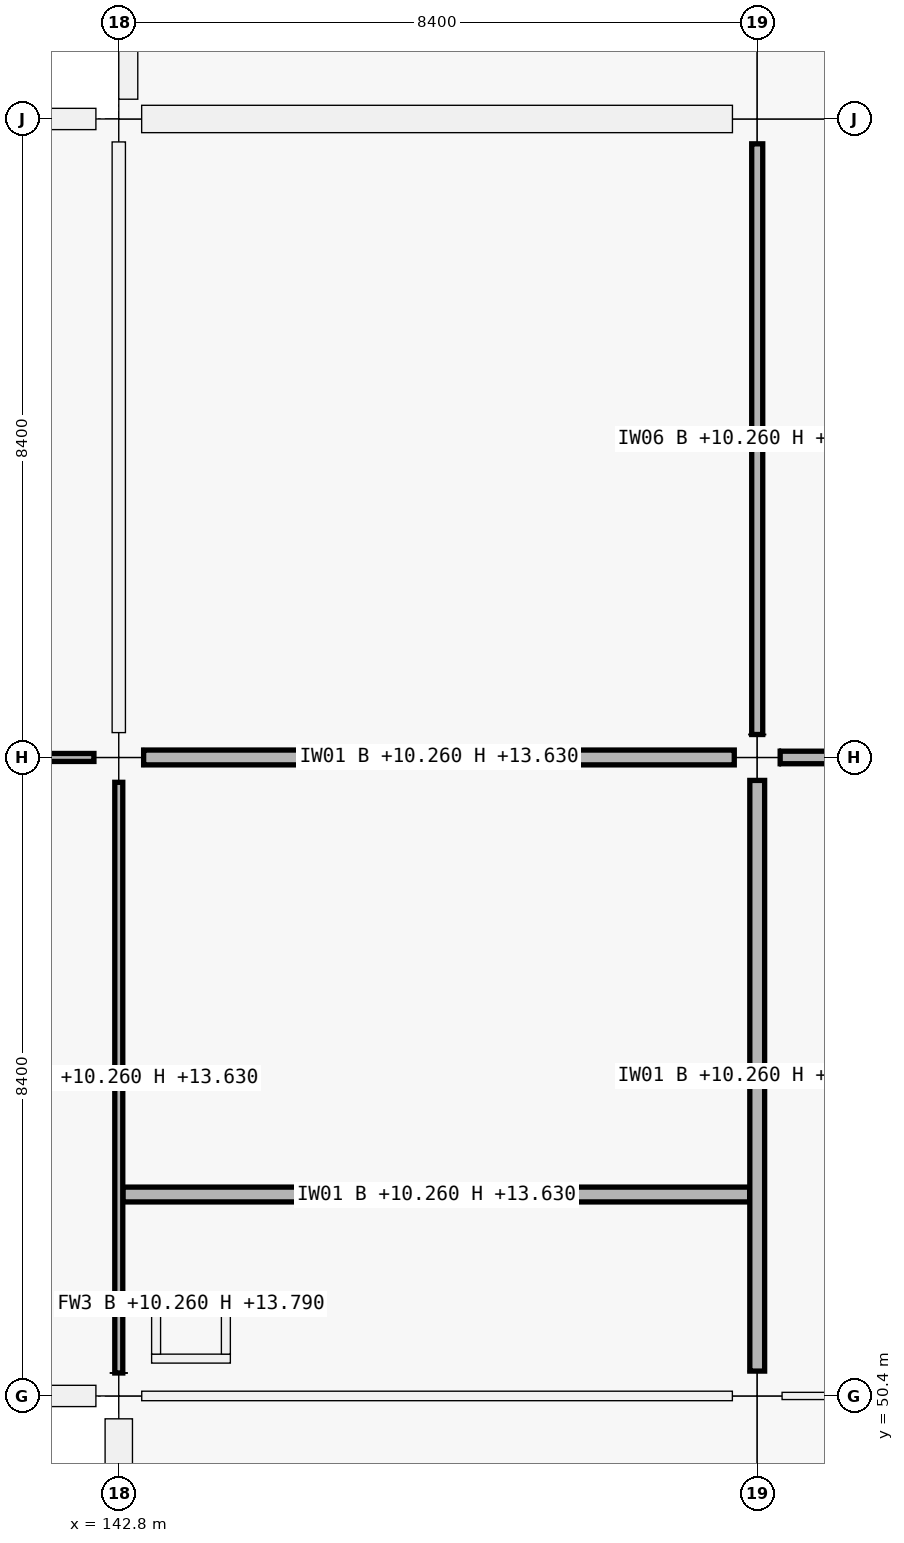
"""IFC4 building model, lengths in metres.
Left out: names, types, materials, properties, quantities, classifications, styles, units other than length and angle.
Written with IfcOpenShell. Run it as: python <this file> out.ifc"""

import sys

from ifc_helpers import new_model, si_unit, direction, frame, frame_2d, origin, origin_2d, place, context, subcontext, project, spatial, rectangle, extrude, element, fill, save


model = new_model("IFC4")
c1 = context("Model", 3, precision=1e-05, world=origin(), true_north=direction((0.0, 1.0)))
c2 = subcontext(c1, "Body", "Model", "MODEL_VIEW")
j1 = project(units=[si_unit("LENGTHUNIT", "METRE"), si_unit("PLANEANGLEUNIT", "RADIAN")], contexts=[c1])
p1 = place(None, origin())
s1 = spatial("IfcSite", under=j1, at=p1, CompositionType="ELEMENT")
p2 = place(p1, origin())
s2 = spatial("IfcBuilding", under=s1, at=p2, CompositionType="ELEMENT")
p3 = place(p2, frame((0.0, 0.0, 10.26)))
s3 = spatial("IfcBuildingStorey", under=s2, at=p3, CompositionType="ELEMENT", Elevation=10.26)
p4 = place(p3, frame((142.8, 50.4, 0.0), z_axis=(0.0, 0.0, 1.0), x_axis=(1.0, 0.0, 0.0)))
e1 = element("IfcColumn", 1, at=p4, inside=s3, PredefinedType="COLUMN", context=c2, shape_type="SweptSolid", body=[
    extrude(rectangle(XDim=0.6, YDim=0.6, at=origin_2d()), origin(), (0.0, 0.0, 1.0), 4.5),
])
p5 = place(p3, frame((142.8, 58.8, 0.0), z_axis=(0.0, 0.0, 1.0), x_axis=(1.0, 0.0, 0.0)))
e2 = element("IfcColumn", 2, at=p5, inside=s3, PredefinedType="COLUMN", context=c2, shape_type="SweptSolid", body=[
    extrude(rectangle(XDim=0.65, YDim=0.65, at=origin_2d()), origin(), (0.0, 0.0, 1.0), 4.5),
])
p6 = place(p3, frame((142.8, 67.2, 0.0), z_axis=(0.0, 0.0, 1.0), x_axis=(1.0, 0.0, 0.0)))
e3 = element("IfcColumn", 3, at=p6, inside=s3, PredefinedType="COLUMN", context=c2, shape_type="SweptSolid", body=[
    extrude(rectangle(XDim=0.6, YDim=0.6, at=origin_2d()), origin(), (0.0, 0.0, 1.0), 4.5),
])
p7 = place(p3, frame((151.2, 50.4, 0.0), z_axis=(0.0, 0.0, 1.0), x_axis=(1.0, 0.0, 0.0)))
e4 = element("IfcColumn", 4, at=p7, inside=s3, PredefinedType="COLUMN", context=c2, shape_type="SweptSolid", body=[
    extrude(rectangle(XDim=0.65, YDim=0.65, at=origin_2d()), origin(), (0.0, 0.0, 1.0), 4.5),
])
p8 = place(p3, frame((151.2, 58.8, 0.0), z_axis=(0.0, 0.0, 1.0), x_axis=(1.0, 0.0, 0.0)))
e5 = element("IfcColumn", 5, at=p8, inside=s3, PredefinedType="COLUMN", context=c2, shape_type="SweptSolid", body=[
    extrude(rectangle(XDim=0.6, YDim=0.6, at=origin_2d()), origin(), (0.0, 0.0, 1.0), 4.5),
])
p9 = place(p3, frame((151.2, 67.2, 0.0), z_axis=(0.0, 0.0, 1.0), x_axis=(1.0, 0.0, 0.0)))
e6 = element("IfcColumn", 6, at=p9, inside=s3, PredefinedType="COLUMN", context=c2, shape_type="SweptSolid", body=[
    extrude(rectangle(XDim=0.65, YDim=0.65, at=origin_2d()), origin(), (0.0, 0.0, 1.0), 4.5),
])
p10 = place(p3, frame((142.499, 50.4, 0.0), z_axis=(0.0, 0.0, 1.0), x_axis=(-1.0, 0.0, 0.0)))
e7 = element("IfcWall", 7, at=p10, inside=s3, PredefinedType="SOLIDWALL", context=c2, shape_type="SweptSolid", body=[
    extrude(rectangle(XDim=7.773, YDim=0.28, at=frame_2d((3.886, 0.0))), origin(), (0.0, 0.0, 1.0), 3.54),
])
p11 = place(p10, frame((2.911, 0.0, 0.9)))
e8 = element("IfcOpeningElement", 8, at=p11, cuts=e7, PredefinedType="OPENING", context=c2, shape_type="SweptSolid", body=[
    extrude(rectangle(XDim=1.95, YDim=1.6, at=frame_2d((0.975, 0.8))), frame((0.0, 0.14, 0.0), z_axis=(0.0, -1.0, 0.0), x_axis=(1.0, 0.0, 0.0)), (0.0, 0.0, 1.0), 0.28),
])
p12 = place(p3, frame((134.676, 67.2, 0.0), z_axis=(0.0, 0.0, 1.0), x_axis=(1.0, 0.0, 0.0)))
e9 = element("IfcWall", 9, at=p12, inside=s3, PredefinedType="SOLIDWALL", context=c2, shape_type="SweptSolid", body=[
    extrude(rectangle(XDim=7.823, YDim=0.28, at=frame_2d((3.912, 0.0))), origin(), (0.0, 0.0, 1.0), 3.54),
])
p13 = place(p12, frame((2.737, 0.0, 0.9)))
e10 = element("IfcOpeningElement", 10, at=p13, cuts=e9, PredefinedType="OPENING", context=c2, shape_type="SweptSolid", body=[
    extrude(rectangle(XDim=2.35, YDim=1.6, at=frame_2d((1.175, 0.8))), frame((0.0, 0.14, 0.0), z_axis=(0.0, -1.0, 0.0), x_axis=(1.0, 0.0, 0.0)), (0.0, 0.0, 1.0), 0.28),
])
p14 = place(p3, frame((142.8, 42.326, 0.0), z_axis=(0.0, 0.0, 1.0), x_axis=(0.0, 1.0, 0.0)))
e11 = element("IfcWall", 11, at=p14, inside=s3, PredefinedType="SOLIDWALL", context=c2, shape_type="SweptSolid", body=[
    extrude(rectangle(XDim=7.773, YDim=0.36, at=frame_2d((3.887, 0.0))), origin(), (0.0, 0.0, 1.0), 3.54),
])
p15 = place(p14, frame((2.837, 0.0, 0.9)))
e12 = element("IfcOpeningElement", 12, at=p15, cuts=e11, PredefinedType="OPENING", context=c2, shape_type="SweptSolid", body=[
    extrude(rectangle(XDim=2.1, YDim=1.8, at=frame_2d((1.05, 0.9))), frame((0.0, 0.18, 0.0), z_axis=(0.0, -1.0, 0.0), x_axis=(1.0, 0.0, 0.0)), (0.0, 0.0, 1.0), 0.36),
])
p16 = place(p3, frame((143.101, 67.2, 0.0), z_axis=(0.0, 0.0, 1.0), x_axis=(1.0, 0.0, 0.0)))
e13 = element("IfcWall", 13, at=p16, inside=s3, PredefinedType="SOLIDWALL", context=c2, shape_type="SweptSolid", body=[
    extrude(rectangle(XDim=7.773, YDim=0.36, at=frame_2d((3.886, 0.0))), origin(), (0.0, 0.0, 1.0), 3.54),
])
p17 = place(p16, frame((2.686, 0.0, 0.9)))
e14 = element("IfcOpeningElement", 14, at=p17, cuts=e13, PredefinedType="OPENING", context=c2, shape_type="SweptSolid", body=[
    extrude(rectangle(XDim=2.4, YDim=1.8, at=frame_2d((1.2, 0.9))), frame((0.0, 0.18, 0.0), z_axis=(0.0, -1.0, 0.0), x_axis=(1.0, 0.0, 0.0)), (0.0, 0.0, 1.0), 0.36),
])
p18 = place(p3, frame((142.925, 67.46, 0.0), z_axis=(0.0, 0.0, 1.0), x_axis=(0.0, 1.0, 0.0)))
e15 = element("IfcWall", 15, at=p18, inside=s3, PredefinedType="PARAPET", context=c2, shape_type="SweptSolid", body=[
    extrude(rectangle(XDim=7.88, YDim=0.25, at=frame_2d((3.94, 0.0))), origin(), (0.0, 0.0, 1.0), 0.95),
])
for number, where, z_axis, x_axis in (
    (16, (143.232, 50.891, 0.0), (0.0, 0.0, 1.0), (1.0, 0.0, 0.0)),
    (17, (143.232, 51.609, 0.0), (0.0, 0.0, 1.0), (1.0, 0.0, 0.0)),
):
    element("IfcWall", number, at=place(p3, frame(where, z_axis=z_axis, x_axis=x_axis)), inside=s3, PredefinedType="PARTITIONING", context=c2, shape_type="SweptSolid", body=[
        extrude(rectangle(XDim=1.036, YDim=0.118, at=frame_2d((0.518, 0.0))), origin(), (0.0, 0.0, 1.0), 3.53),
    ])
for number, where, z_axis, x_axis in (
    (18, (143.291, 50.95, 0.0), (0.0, 0.0, 1.0), (0.0, 1.0, 0.0)),
    (19, (144.209, 50.95, 0.0), (0.0, 0.0, 1.0), (0.0, 1.0, 0.0)),
):
    element("IfcWall", number, at=place(p3, frame(where, z_axis=z_axis, x_axis=x_axis)), inside=s3, PredefinedType="PARTITIONING", context=c2, shape_type="SweptSolid", body=[
        extrude(rectangle(XDim=0.6, YDim=0.118, at=frame_2d((0.3, 0.0))), origin(), (0.0, 0.0, 1.0), 3.53),
    ])
p19 = place(p3, frame((134.702, 58.8, 0.0), z_axis=(0.0, 0.0, 1.0), x_axis=(1.0, 0.0, 0.0)))
e20 = element("IfcWall", 20, at=p19, inside=s3, PredefinedType="PARTITIONING", context=c2, shape_type="SweptSolid", body=[
    extrude(rectangle(XDim=7.771, YDim=0.105, at=frame_2d((3.885, 0.0))), origin(), (0.0, 0.0, 1.0), 3.37),
])
p20 = place(p19, frame((3.415, 0.0, 0.0)))
e21 = element("IfcOpeningElement", 21, at=p20, cuts=e20, PredefinedType="OPENING", context=c2, shape_type="SweptSolid", body=[
    extrude(rectangle(XDim=0.94, YDim=2.15, at=frame_2d((0.47, 1.075))), frame((0.0, 0.052, 0.0), z_axis=(0.0, -1.0, 0.0), x_axis=(1.0, 0.0, 0.0)), (0.0, 0.0, 1.0), 0.105),
])
p21 = place(p3, frame((143.102, 50.4, 0.0), z_axis=(0.0, 0.0, 1.0), x_axis=(1.0, 0.0, 0.0)))
e22 = element("IfcWall", 22, at=p21, inside=s3, PredefinedType="PARTITIONING", context=c2, shape_type="SweptSolid", body=[
    extrude(rectangle(XDim=7.771, YDim=0.125, at=frame_2d((3.885, 0.0))), origin(), (0.0, 0.0, 1.0), 3.37),
])
p22 = place(p3, frame((143.127, 58.8, 0.0), z_axis=(0.0, 0.0, 1.0), x_axis=(1.0, 0.0, 0.0)))
e23 = element("IfcWall", 23, at=p22, inside=s3, PredefinedType="PARTITIONING", context=c2, shape_type="SweptSolid", body=[
    extrude(rectangle(XDim=7.771, YDim=0.195, at=frame_2d((3.885, 0.0))), origin(), (0.0, 0.0, 1.0), 3.37),
])
p23 = place(p3, frame((151.527, 50.4, 0.0), z_axis=(0.0, 0.0, 1.0), x_axis=(1.0, 0.0, 0.0)))
e24 = element("IfcWall", 24, at=p23, inside=s3, PredefinedType="PARTITIONING", context=c2, shape_type="SweptSolid", body=[
    extrude(rectangle(XDim=7.771, YDim=0.095, at=frame_2d((3.885, 0.0))), origin(), (0.0, 0.0, 1.0), 3.37),
])
p24 = place(p23, frame((3.405, 0.0, 0.0)))
e25 = element("IfcOpeningElement", 25, at=p24, cuts=e24, PredefinedType="OPENING", context=c2, shape_type="SweptSolid", body=[
    extrude(rectangle(XDim=0.96, YDim=2.18, at=frame_2d((0.48, 1.09))), frame((0.0, 0.047, 0.0), z_axis=(0.0, -1.0, 0.0), x_axis=(1.0, 0.0, 0.0)), (0.0, 0.0, 1.0), 0.095),
])
p25 = place(p3, frame((151.502, 58.8, 0.0), z_axis=(0.0, 0.0, 1.0), x_axis=(1.0, 0.0, 0.0)))
e26 = element("IfcWall", 26, at=p25, inside=s3, PredefinedType="PARTITIONING", context=c2, shape_type="SweptSolid", body=[
    extrude(rectangle(XDim=7.771, YDim=0.165, at=frame_2d((3.885, 0.0))), origin(), (0.0, 0.0, 1.0), 3.37),
])
p26 = place(p25, frame((3.415, 0.0, 0.0)))
e27 = element("IfcOpeningElement", 27, at=p26, cuts=e26, PredefinedType="OPENING", context=c2, shape_type="SweptSolid", body=[
    extrude(rectangle(XDim=0.94, YDim=2.15, at=frame_2d((0.47, 1.075))), frame((0.0, 0.083, 0.0), z_axis=(0.0, -1.0, 0.0), x_axis=(1.0, 0.0, 0.0)), (0.0, 0.0, 1.0), 0.165),
])
p27 = place(p3, frame((142.8, 50.702, 0.0), z_axis=(0.0, 0.0, 1.0), x_axis=(0.0, 1.0, 0.0)))
e28 = element("IfcWall", 28, at=p27, inside=s3, PredefinedType="PARTITIONING", context=c2, shape_type="SweptSolid", body=[
    extrude(rectangle(XDim=7.771, YDim=0.105, at=frame_2d((3.885, 0.0))), origin(), (0.0, 0.0, 1.0), 3.37),
])
p28 = place(p27, frame((0.673, 0.0, 0.0)))
e29 = element("IfcOpeningElement", 29, at=p28, cuts=e28, PredefinedType="OPENING", context=c2, shape_type="SweptSolid", body=[
    extrude(rectangle(XDim=0.98, YDim=2.08, at=frame_2d((0.49, 1.04))), frame((0.0, 0.052, 0.0), z_axis=(0.0, -1.0, 0.0), x_axis=(1.0, 0.0, 0.0)), (0.0, 0.0, 1.0), 0.105),
])
p29 = place(p27, frame((4.613, 0.0, 0.0)))
e30 = element("IfcOpeningElement", 30, at=p29, cuts=e28, PredefinedType="OPENING", context=c2, shape_type="SweptSolid", body=[
    extrude(rectangle(XDim=0.94, YDim=2.08, at=frame_2d((0.47, 1.04))), frame((0.0, 0.052, 0.0), z_axis=(0.0, -1.0, 0.0), x_axis=(1.0, 0.0, 0.0)), (0.0, 0.0, 1.0), 0.105),
])
p30 = place(p3, frame((142.8, 59.127, 0.0), z_axis=(0.0, 0.0, 1.0), x_axis=(0.0, 1.0, 0.0)))
e31 = element("IfcWall", 31, at=p30, inside=s3, PredefinedType="PARTITIONING", context=c2, shape_type="SweptSolid", body=[
    extrude(rectangle(XDim=7.771, YDim=0.175, at=frame_2d((3.885, 0.0))), origin(), (0.0, 0.0, 1.0), 3.37),
])
p31 = place(p30, frame((3.345, 0.0, 0.0)))
e32 = element("IfcOpeningElement", 32, at=p31, cuts=e31, PredefinedType="OPENING", context=c2, shape_type="SweptSolid", body=[
    extrude(rectangle(XDim=1.08, YDim=2.25, at=frame_2d((0.54, 1.125))), frame((0.0, 0.087, 0.0), z_axis=(0.0, -1.0, 0.0), x_axis=(1.0, 0.0, 0.0)), (0.0, 0.0, 1.0), 0.175),
])
p32 = place(p3, frame((151.2, 50.727, 0.0), z_axis=(0.0, 0.0, 1.0), x_axis=(0.0, 1.0, 0.0)))
e33 = element("IfcWall", 33, at=p32, inside=s3, PredefinedType="PARTITIONING", context=c2, shape_type="SweptSolid", body=[
    extrude(rectangle(XDim=7.771, YDim=0.195, at=frame_2d((3.885, 0.0))), origin(), (0.0, 0.0, 1.0), 3.37),
])
p33 = place(p3, frame((151.2, 59.102, 0.0), z_axis=(0.0, 0.0, 1.0), x_axis=(0.0, 1.0, 0.0)))
e34 = element("IfcWall", 34, at=p33, inside=s3, PredefinedType="PARTITIONING", context=c2, shape_type="SweptSolid", body=[
    extrude(rectangle(XDim=7.771, YDim=0.145, at=frame_2d((3.885, 0.0))), origin(), (0.0, 0.0, 1.0), 3.37),
])
p34 = place(p33, frame((3.401, 0.0, 0.0)))
e35 = element("IfcOpeningElement", 35, at=p34, cuts=e34, PredefinedType="OPENING", context=c2, shape_type="SweptSolid", body=[
    extrude(rectangle(XDim=0.97, YDim=2.12, at=frame_2d((0.485, 1.06))), frame((0.0, 0.073, 0.0), z_axis=(0.0, -1.0, 0.0), x_axis=(1.0, 0.0, 0.0)), (0.0, 0.0, 1.0), 0.145),
])
p35 = place(p3, frame((142.854, 53.05, 0.0), z_axis=(0.0, 0.0, 1.0), x_axis=(1.0, 0.0, 0.0)))
e36 = element("IfcWall", 36, at=p35, inside=s3, PredefinedType="PARTITIONING", context=c2, shape_type="SweptSolid", body=[
    extrude(rectangle(XDim=8.246, YDim=0.195, at=frame_2d((4.123, 0.0))), origin(), (0.0, 0.0, 1.0), 3.37),
])
p36 = place(p17, origin())
e37 = element("IfcWindow", 37, at=p36, inside=s3, PartitioningType="SINGLE_PANEL", PredefinedType="WINDOW", context=c2, shape_type="SweptSolid", body=[
    extrude(rectangle(XDim=2.4, YDim=1.8, at=frame_2d((1.2, 0.9))), frame((0.0, 0.03, 0.0), z_axis=(0.0, -1.0, 0.0), x_axis=(1.0, 0.0, 0.0)), (0.0, 0.0, 1.0), 0.06),
])
fill(e14, e37)
p37 = place(p28, origin())
e38 = element("IfcDoor", 38, at=p37, inside=s3, OperationType="SINGLE_SWING_RIGHT", PredefinedType="DOOR", context=c2, shape_type="SweptSolid", body=[
    extrude(rectangle(XDim=0.98, YDim=2.08, at=frame_2d((0.49, 1.04))), frame((0.0, 0.025, 0.0), z_axis=(0.0, -1.0, 0.0), x_axis=(1.0, 0.0, 0.0)), (0.0, 0.0, 1.0), 0.05),
])
fill(e29, e38)
p38 = place(p29, origin())
e39 = element("IfcDoor", 39, at=p38, inside=s3, OperationType="SINGLE_SWING_LEFT", PredefinedType="DOOR", context=c2, shape_type="SweptSolid", body=[
    extrude(rectangle(XDim=0.94, YDim=2.08, at=frame_2d((0.47, 1.04))), frame((0.0, 0.025, 0.0), z_axis=(0.0, -1.0, 0.0), x_axis=(1.0, 0.0, 0.0)), (0.0, 0.0, 1.0), 0.05),
])
fill(e30, e39)
p39 = place(p31, origin())
e40 = element("IfcDoor", 40, at=p39, inside=s3, OperationType="SINGLE_SWING_LEFT", PredefinedType="DOOR", context=c2, shape_type="SweptSolid", body=[
    extrude(rectangle(XDim=1.08, YDim=2.25, at=frame_2d((0.54, 1.125))), frame((0.0, 0.025, 0.0), z_axis=(0.0, -1.0, 0.0), x_axis=(1.0, 0.0, 0.0)), (0.0, 0.0, 1.0), 0.05),
])
fill(e32, e40)
p40 = place(p34, origin())
e41 = element("IfcDoor", 41, at=p40, inside=s3, OperationType="SINGLE_SWING_LEFT", PredefinedType="DOOR", context=c2, shape_type="SweptSolid", body=[
    extrude(rectangle(XDim=0.97, YDim=2.12, at=frame_2d((0.485, 1.06))), frame((0.0, 0.025, 0.0), z_axis=(0.0, -1.0, 0.0), x_axis=(1.0, 0.0, 0.0)), (0.0, 0.0, 1.0), 0.05),
])
fill(e35, e41)
save(model, sys.argv[1])
